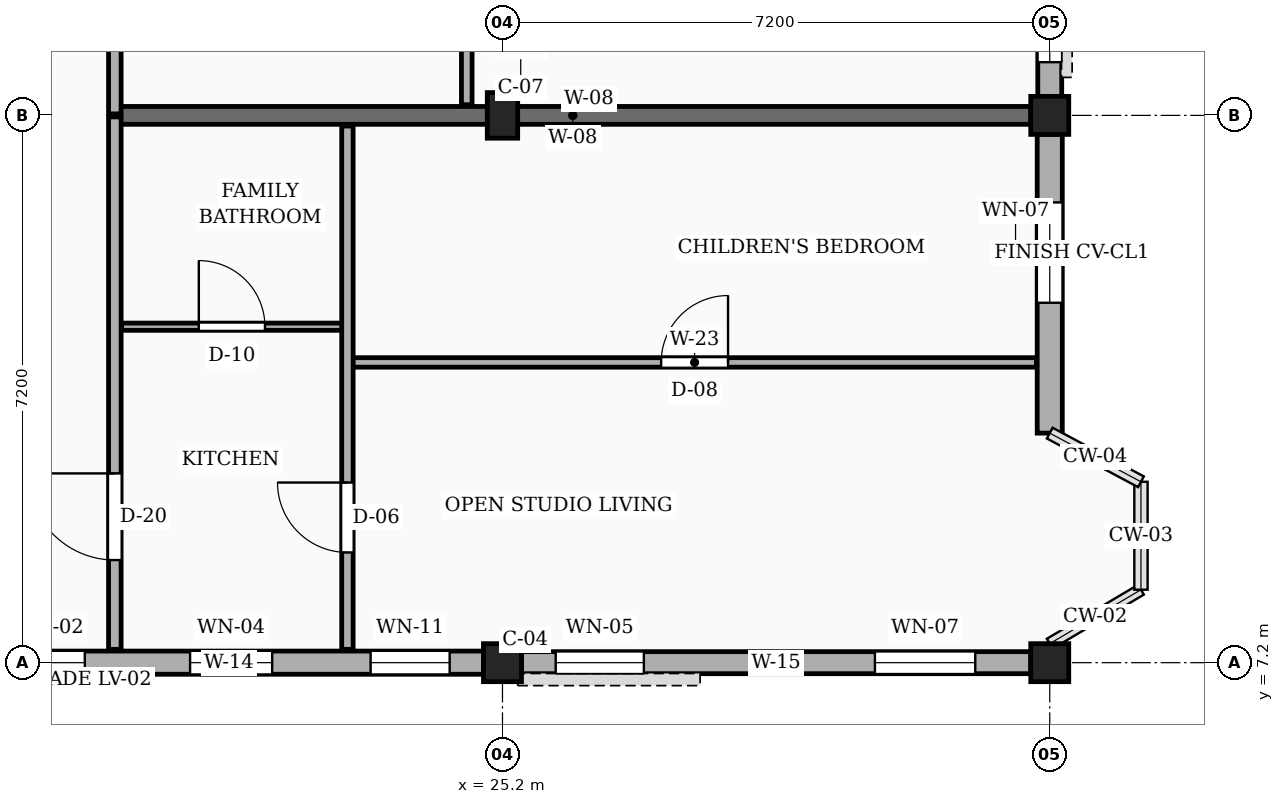
"""IFC4 building model, lengths in metres.
Left out: names, types, materials, properties, quantities, classifications, styles, units other than length and angle.
Written with IfcOpenShell. Run it as: python <this file> out.ifc"""

import sys

from ifc_helpers import new_model, si_unit, direction, frame, frame_2d, origin, origin_2d, place, context, subcontext, project, spatial, rectangle, extrude, element, fill, save


model = new_model("IFC4")
c1 = context("Model", 3, precision=1e-05, world=origin(), true_north=direction((0.0, 1.0)))
c2 = subcontext(c1, "Body", "Model", "MODEL_VIEW")
j1 = project(units=[si_unit("LENGTHUNIT", "METRE"), si_unit("PLANEANGLEUNIT", "RADIAN")], contexts=[c1])
p1 = place(None, origin())
s1 = spatial("IfcSite", under=j1, at=p1, CompositionType="ELEMENT")
p2 = place(p1, origin())
s2 = spatial("IfcBuilding", under=s1, at=p2, CompositionType="ELEMENT")
p3 = place(p2, frame((0.0, 0.0, 23.4)))
s3 = spatial("IfcBuildingStorey", under=s2, at=p3, CompositionType="ELEMENT", Elevation=23.4)
p4 = place(p3, frame((25.2, 7.2, 0.0), z_axis=(0.0, 0.0, 1.0), x_axis=(1.0, 0.0, 0.0)))
e1 = element("IfcColumn", 1, at=p4, inside=s3, PredefinedType="COLUMN", context=c2, shape_type="SweptSolid", body=[
    extrude(rectangle(XDim=0.5, YDim=0.5, at=origin_2d()), origin(), (0.0, 0.0, 1.0), 3.15),
])
p5 = place(p3, frame((25.2, 14.4, 0.0), z_axis=(0.0, 0.0, 1.0), x_axis=(1.0, 0.0, 0.0)))
e2 = element("IfcColumn", 2, at=p5, inside=s3, PredefinedType="COLUMN", context=c2, shape_type="SweptSolid", body=[
    extrude(rectangle(XDim=0.4, YDim=0.6, at=origin_2d()), origin(), (0.0, 0.0, 1.0), 3.15),
])
for number, where, z_axis, x_axis in (
    (3, (32.4, 7.2, 0.0), (0.0, 0.0, 1.0), (1.0, 0.0, 0.0)),
    (4, (32.4, 14.4, 0.0), (0.0, 0.0, 1.0), (1.0, 0.0, 0.0)),
):
    element("IfcColumn", number, at=place(p3, frame(where, z_axis=z_axis, x_axis=x_axis)), inside=s3, PredefinedType="COLUMN", context=c2, shape_type="SweptSolid", body=[
        extrude(rectangle(XDim=0.5, YDim=0.5, at=origin_2d()), origin(), (0.0, 0.0, 1.0), 3.15),
    ])
p6 = place(p3, frame((20.1, 14.4, 0.0), z_axis=(0.0, 0.0, 1.0), x_axis=(1.0, 0.0, 0.0)))
e5 = element("IfcWall", 5, at=p6, inside=s3, PredefinedType="SOLIDWALL", context=c2, shape_type="SweptSolid", body=[
    extrude(rectangle(XDim=12.05, YDim=0.235, at=frame_2d((6.025, 0.0))), origin(), (0.0, 0.0, 1.0), 2.17),
])
p7 = place(p3, frame((18.25, 7.2, 0.0), z_axis=(0.0, 0.0, 1.0), x_axis=(1.0, 0.0, 0.0)))
e6 = element("IfcWall", 6, at=p7, inside=s3, PredefinedType="SOLIDWALL", context=c2, shape_type="SweptSolid", body=[
    extrude(rectangle(XDim=6.7, YDim=0.305, at=frame_2d((3.35, 0.0))), origin(), (0.0, 0.0, 1.0), 2.44),
])
p8 = place(p7, frame((0.535, 0.0, 0.78)))
e7 = element("IfcOpeningElement", 7, at=p8, cuts=e6, PredefinedType="OPENING", context=c2, shape_type="SweptSolid", body=[
    extrude(rectangle(XDim=0.92, YDim=1.15, at=frame_2d((0.46, 0.575))), frame((0.0, 0.163, 0.0), z_axis=(0.0, -1.0, 0.0), x_axis=(1.0, 0.0, 0.0)), (0.0, 0.0, 1.0), 0.325),
])
p9 = place(p7, frame((2.84, 0.0, 0.78)))
e8 = element("IfcOpeningElement", 8, at=p9, cuts=e6, PredefinedType="OPENING", context=c2, shape_type="SweptSolid", body=[
    extrude(rectangle(XDim=1.08, YDim=1.15, at=frame_2d((0.54, 0.575))), frame((0.0, 0.163, 0.0), z_axis=(0.0, -1.0, 0.0), x_axis=(1.0, 0.0, 0.0)), (0.0, 0.0, 1.0), 0.325),
])
p10 = place(p7, frame((5.215, 0.0, 0.78)))
e9 = element("IfcOpeningElement", 9, at=p10, cuts=e6, PredefinedType="OPENING", context=c2, shape_type="SweptSolid", body=[
    extrude(rectangle(XDim=1.04, YDim=1.26, at=frame_2d((0.52, 0.63))), frame((0.0, 0.163, 0.0), z_axis=(0.0, -1.0, 0.0), x_axis=(1.0, 0.0, 0.0)), (0.0, 0.0, 1.0), 0.325),
])
p11 = place(p3, frame((25.45, 7.2, 0.0), z_axis=(0.0, 0.0, 1.0), x_axis=(1.0, 0.0, 0.0)))
e10 = element("IfcWall", 10, at=p11, inside=s3, PredefinedType="SOLIDWALL", context=c2, shape_type="SweptSolid", body=[
    extrude(rectangle(XDim=6.7, YDim=0.29, at=frame_2d((3.35, 0.0))), origin(), (0.0, 0.0, 1.0), 2.44),
])
p12 = place(p11, frame((0.45, 0.0, 0.78)))
e11 = element("IfcOpeningElement", 11, at=p12, cuts=e10, PredefinedType="OPENING", context=c2, shape_type="SweptSolid", body=[
    extrude(rectangle(XDim=1.16, YDim=1.15, at=frame_2d((0.58, 0.575))), frame((0.0, 0.155, 0.0), z_axis=(0.0, -1.0, 0.0), x_axis=(1.0, 0.0, 0.0)), (0.0, 0.0, 1.0), 0.31),
])
p13 = place(p11, frame((4.65, 0.0, 0.78)))
e12 = element("IfcOpeningElement", 12, at=p13, cuts=e10, PredefinedType="OPENING", context=c2, shape_type="SweptSolid", body=[
    extrude(rectangle(XDim=1.32, YDim=1.15, at=frame_2d((0.66, 0.575))), frame((0.0, 0.155, 0.0), z_axis=(0.0, -1.0, 0.0), x_axis=(1.0, 0.0, 0.0)), (0.0, 0.0, 1.0), 0.31),
])
p14 = place(p3, frame((32.4, 10.22, 0.0), z_axis=(0.0, 0.0, 1.0), x_axis=(0.0, 1.0, 0.0)))
e13 = element("IfcWall", 13, at=p14, inside=s3, PredefinedType="SOLIDWALL", context=c2, shape_type="SweptSolid", body=[
    extrude(rectangle(XDim=3.93, YDim=0.33, at=frame_2d((1.965, 0.0))), origin(), (0.0, 0.0, 1.0), 2.44),
])
p15 = place(p14, frame((1.715, 0.0, 0.78)))
e14 = element("IfcOpeningElement", 14, at=p15, cuts=e13, PredefinedType="OPENING", context=c2, shape_type="SweptSolid", body=[
    extrude(rectangle(XDim=1.32, YDim=1.15, at=frame_2d((0.66, 0.575))), frame((0.0, 0.175, 0.0), z_axis=(0.0, -1.0, 0.0), x_axis=(1.0, 0.0, 0.0)), (0.0, 0.0, 1.0), 0.35),
])
p16 = place(p3, frame((32.4, 14.65, 0.0), z_axis=(0.0, 0.0, 1.0), x_axis=(0.0, 1.0, 0.0)))
e15 = element("IfcWall", 15, at=p16, inside=s3, PredefinedType="SOLIDWALL", context=c2, shape_type="SweptSolid", body=[
    extrude(rectangle(XDim=6.7, YDim=0.315, at=frame_2d((3.35, 0.0))), origin(), (0.0, 0.0, 1.0), 2.44),
])
p17 = place(p16, frame((0.45, 0.0, 0.78)))
e16 = element("IfcOpeningElement", 16, at=p17, cuts=e15, PredefinedType="OPENING", context=c2, shape_type="SweptSolid", body=[
    extrude(rectangle(XDim=1.4, YDim=1.15, at=frame_2d((0.7, 0.575))), frame((0.0, 0.167, 0.0), z_axis=(0.0, -1.0, 0.0), x_axis=(1.0, 0.0, 0.0)), (0.0, 0.0, 1.0), 0.335),
])
p18 = place(p16, frame((4.65, 0.0, 0.78)))
e17 = element("IfcOpeningElement", 17, at=p18, cuts=e15, PredefinedType="OPENING", context=c2, shape_type="SweptSolid", body=[
    extrude(rectangle(XDim=0.96, YDim=1.26, at=frame_2d((0.48, 0.63))), frame((0.0, 0.167, 0.0), z_axis=(0.0, -1.0, 0.0), x_axis=(1.0, 0.0, 0.0)), (0.0, 0.0, 1.0), 0.335),
])
p19 = place(p3, frame((20.1, 7.375, 0.0), z_axis=(0.0, 0.0, 1.0), x_axis=(0.0, 1.0, 0.0)))
e18 = element("IfcWall", 18, at=p19, inside=s3, PredefinedType="PARTITIONING", context=c2, shape_type="SweptSolid", body=[
    extrude(rectangle(XDim=7.005, YDim=0.165, at=frame_2d((3.502, 0.0))), origin(), (0.0, 0.0, 1.0), 2.305),
])
p20 = place(p19, frame((1.175, 0.0, 0.0)))
e19 = element("IfcOpeningElement", 19, at=p20, cuts=e18, PredefinedType="OPENING", context=c2, shape_type="SweptSolid", body=[
    extrude(rectangle(XDim=1.14, YDim=2.18, at=frame_2d((0.57, 1.09))), frame((0.0, 0.093, 0.0), z_axis=(0.0, -1.0, 0.0), x_axis=(1.0, 0.0, 0.0)), (0.0, 0.0, 1.0), 0.185),
])
p21 = place(p3, frame((20.1, 14.42, 0.0), z_axis=(0.0, 0.0, 1.0), x_axis=(0.0, 1.0, 0.0)))
e20 = element("IfcWall", 20, at=p21, inside=s3, PredefinedType="PARTITIONING", context=c2, shape_type="SweptSolid", body=[
    extrude(rectangle(XDim=7.16, YDim=0.165, at=frame_2d((3.58, 0.0))), origin(), (0.0, 0.0, 1.0), 2.305),
])
p22 = place(p21, frame((4.78, 0.0, 0.0)))
e21 = element("IfcOpeningElement", 21, at=p22, cuts=e20, PredefinedType="OPENING", context=c2, shape_type="SweptSolid", body=[
    extrude(rectangle(XDim=1.0, YDim=2.15, at=frame_2d((0.5, 1.075))), frame((0.0, 0.093, 0.0), z_axis=(0.0, -1.0, 0.0), x_axis=(1.0, 0.0, 0.0)), (0.0, 0.0, 1.0), 0.185),
])
p23 = place(p3, frame((23.23, 11.15, 0.0), z_axis=(0.0, 0.0, 1.0), x_axis=(1.0, 0.0, 0.0)))
e22 = element("IfcWall", 22, at=p23, inside=s3, PredefinedType="PARTITIONING", context=c2, shape_type="SweptSolid", body=[
    extrude(rectangle(XDim=8.995, YDim=0.125, at=frame_2d((4.498, 0.0))), origin(), (0.0, 0.0, 1.0), 2.305),
])
p24 = place(p23, frame((4.058, 0.0, 0.0)))
e23 = element("IfcOpeningElement", 23, at=p24, cuts=e22, PredefinedType="OPENING", context=c2, shape_type="SweptSolid", body=[
    extrude(rectangle(XDim=0.88, YDim=2.08, at=frame_2d((0.44, 1.04))), frame((0.0, 0.073, 0.0), z_axis=(0.0, -1.0, 0.0), x_axis=(1.0, 0.0, 0.0)), (0.0, 0.0, 1.0), 0.145),
])
p25 = place(p3, frame((20.19, 11.62, 0.0), z_axis=(0.0, 0.0, 1.0), x_axis=(1.0, 0.0, 0.0)))
e24 = element("IfcWall", 24, at=p25, inside=s3, PredefinedType="PARTITIONING", context=c2, shape_type="SweptSolid", body=[
    extrude(rectangle(XDim=2.9, YDim=0.095, at=frame_2d((1.45, 0.0))), origin(), (0.0, 0.0, 1.0), 2.305),
])
p26 = place(p25, frame((1.015, 0.0, 0.0)))
e25 = element("IfcOpeningElement", 25, at=p26, cuts=e24, PredefinedType="OPENING", context=c2, shape_type="SweptSolid", body=[
    extrude(rectangle(XDim=0.87, YDim=2.05, at=frame_2d((0.435, 1.025))), frame((0.0, 0.058, 0.0), z_axis=(0.0, -1.0, 0.0), x_axis=(1.0, 0.0, 0.0)), (0.0, 0.0, 1.0), 0.115),
])
p27 = place(p3, frame((23.16, 7.375, 0.0), z_axis=(0.0, 0.0, 1.0), x_axis=(0.0, 1.0, 0.0)))
e26 = element("IfcWall", 26, at=p27, inside=s3, PredefinedType="PARTITIONING", context=c2, shape_type="SweptSolid", body=[
    extrude(rectangle(XDim=6.885, YDim=0.15, at=frame_2d((3.442, 0.0))), origin(), (0.0, 0.0, 1.0), 2.305),
])
p28 = place(p27, frame((1.275, 0.0, 0.0)))
e27 = element("IfcOpeningElement", 27, at=p28, cuts=e26, PredefinedType="OPENING", context=c2, shape_type="SweptSolid", body=[
    extrude(rectangle(XDim=0.92, YDim=2.1, at=frame_2d((0.46, 1.05))), frame((0.0, 0.085, 0.0), z_axis=(0.0, -1.0, 0.0), x_axis=(1.0, 0.0, 0.0)), (0.0, 0.0, 1.0), 0.17),
])
p29 = place(p3, frame((24.73, 14.54, 0.0), z_axis=(0.0, 0.0, 1.0), x_axis=(0.0, 1.0, 0.0)))
e28 = element("IfcWall", 28, at=p29, inside=s3, PredefinedType="PARTITIONING", context=c2, shape_type="SweptSolid", body=[
    extrude(rectangle(XDim=6.92, YDim=0.14, at=frame_2d((3.46, 0.0))), origin(), (0.0, 0.0, 1.0), 2.305),
])
p30 = place(p29, frame((4.66, 0.0, 0.0)))
e29 = element("IfcOpeningElement", 29, at=p30, cuts=e28, PredefinedType="OPENING", context=c2, shape_type="SweptSolid", body=[
    extrude(rectangle(XDim=0.95, YDim=2.1, at=frame_2d((0.475, 1.05))), frame((0.0, 0.08, 0.0), z_axis=(0.0, -1.0, 0.0), x_axis=(1.0, 0.0, 0.0)), (0.0, 0.0, 1.0), 0.16),
])
p31 = place(p8, origin())
e30 = element("IfcWindow", 30, at=p31, inside=s3, PartitioningType="SINGLE_PANEL", PredefinedType="WINDOW", context=c2, shape_type="SweptSolid", body=[
    extrude(rectangle(XDim=0.92, YDim=1.15, at=frame_2d((0.46, 0.575))), frame((0.0, 0.03, 0.0), z_axis=(0.0, -1.0, 0.0), x_axis=(1.0, 0.0, 0.0)), (0.0, 0.0, 1.0), 0.06),
])
fill(e7, e30)
p32 = place(p9, origin())
e31 = element("IfcWindow", 31, at=p32, inside=s3, PartitioningType="SINGLE_PANEL", PredefinedType="WINDOW", context=c2, shape_type="SweptSolid", body=[
    extrude(rectangle(XDim=1.08, YDim=1.15, at=frame_2d((0.54, 0.575))), frame((0.0, 0.03, 0.0), z_axis=(0.0, -1.0, 0.0), x_axis=(1.0, 0.0, 0.0)), (0.0, 0.0, 1.0), 0.06),
])
fill(e8, e31)
p33 = place(p10, origin())
e32 = element("IfcWindow", 32, at=p33, inside=s3, PartitioningType="SINGLE_PANEL", PredefinedType="WINDOW", context=c2, shape_type="SweptSolid", body=[
    extrude(rectangle(XDim=1.04, YDim=1.26, at=frame_2d((0.52, 0.63))), frame((0.0, 0.03, 0.0), z_axis=(0.0, -1.0, 0.0), x_axis=(1.0, 0.0, 0.0)), (0.0, 0.0, 1.0), 0.06),
])
fill(e9, e32)
p34 = place(p12, origin())
e33 = element("IfcWindow", 33, at=p34, inside=s3, PartitioningType="SINGLE_PANEL", PredefinedType="WINDOW", context=c2, shape_type="SweptSolid", body=[
    extrude(rectangle(XDim=1.16, YDim=1.15, at=frame_2d((0.58, 0.575))), frame((0.0, 0.03, 0.0), z_axis=(0.0, -1.0, 0.0), x_axis=(1.0, 0.0, 0.0)), (0.0, 0.0, 1.0), 0.06),
])
fill(e11, e33)
p35 = place(p13, origin())
e34 = element("IfcWindow", 34, at=p35, inside=s3, PartitioningType="SINGLE_PANEL", PredefinedType="WINDOW", context=c2, shape_type="SweptSolid", body=[
    extrude(rectangle(XDim=1.32, YDim=1.15, at=frame_2d((0.66, 0.575))), frame((0.0, 0.03, 0.0), z_axis=(0.0, -1.0, 0.0), x_axis=(1.0, 0.0, 0.0)), (0.0, 0.0, 1.0), 0.06),
])
fill(e12, e34)
p36 = place(p15, origin())
e35 = element("IfcWindow", 35, at=p36, inside=s3, PartitioningType="SINGLE_PANEL", PredefinedType="WINDOW", context=c2, shape_type="SweptSolid", body=[
    extrude(rectangle(XDim=1.32, YDim=1.15, at=frame_2d((0.66, 0.575))), frame((0.0, 0.03, 0.0), z_axis=(0.0, -1.0, 0.0), x_axis=(1.0, 0.0, 0.0)), (0.0, 0.0, 1.0), 0.06),
])
fill(e14, e35)
p37 = place(p17, origin())
e36 = element("IfcWindow", 36, at=p37, inside=s3, PartitioningType="SINGLE_PANEL", PredefinedType="WINDOW", context=c2, shape_type="SweptSolid", body=[
    extrude(rectangle(XDim=1.4, YDim=1.15, at=frame_2d((0.7, 0.575))), frame((0.0, 0.03, 0.0), z_axis=(0.0, -1.0, 0.0), x_axis=(1.0, 0.0, 0.0)), (0.0, 0.0, 1.0), 0.06),
])
fill(e16, e36)
p38 = place(p20, origin())
e37 = element("IfcDoor", 37, at=p38, inside=s3, OperationType="SINGLE_SWING_RIGHT", PredefinedType="DOOR", context=c2, shape_type="SweptSolid", body=[
    extrude(rectangle(XDim=1.14, YDim=2.18, at=frame_2d((0.57, 1.09))), frame((0.0, 0.025, 0.0), z_axis=(0.0, -1.0, 0.0), x_axis=(1.0, 0.0, 0.0)), (0.0, 0.0, 1.0), 0.05),
])
fill(e19, e37)
p39 = place(p24, origin())
e38 = element("IfcDoor", 38, at=p39, inside=s3, OperationType="SINGLE_SWING_RIGHT", PredefinedType="DOOR", context=c2, shape_type="SweptSolid", body=[
    extrude(rectangle(XDim=0.88, YDim=2.08, at=frame_2d((0.44, 1.04))), frame((0.0, 0.025, 0.0), z_axis=(0.0, -1.0, 0.0), x_axis=(1.0, 0.0, 0.0)), (0.0, 0.0, 1.0), 0.05),
])
fill(e23, e38)
p40 = place(p26, origin())
e39 = element("IfcDoor", 39, at=p40, inside=s3, OperationType="SINGLE_SWING_LEFT", PredefinedType="DOOR", context=c2, shape_type="SweptSolid", body=[
    extrude(rectangle(XDim=0.87, YDim=2.05, at=frame_2d((0.435, 1.025))), frame((0.0, 0.025, 0.0), z_axis=(0.0, -1.0, 0.0), x_axis=(1.0, 0.0, 0.0)), (0.0, 0.0, 1.0), 0.05),
])
fill(e25, e39)
p41 = place(p28, origin())
e40 = element("IfcDoor", 40, at=p41, inside=s3, OperationType="SINGLE_SWING_RIGHT", PredefinedType="DOOR", context=c2, shape_type="SweptSolid", body=[
    extrude(rectangle(XDim=0.92, YDim=2.1, at=frame_2d((0.46, 1.05))), frame((0.0, 0.025, 0.0), z_axis=(0.0, -1.0, 0.0), x_axis=(1.0, 0.0, 0.0)), (0.0, 0.0, 1.0), 0.05),
])
fill(e27, e40)
save(model, sys.argv[1])
